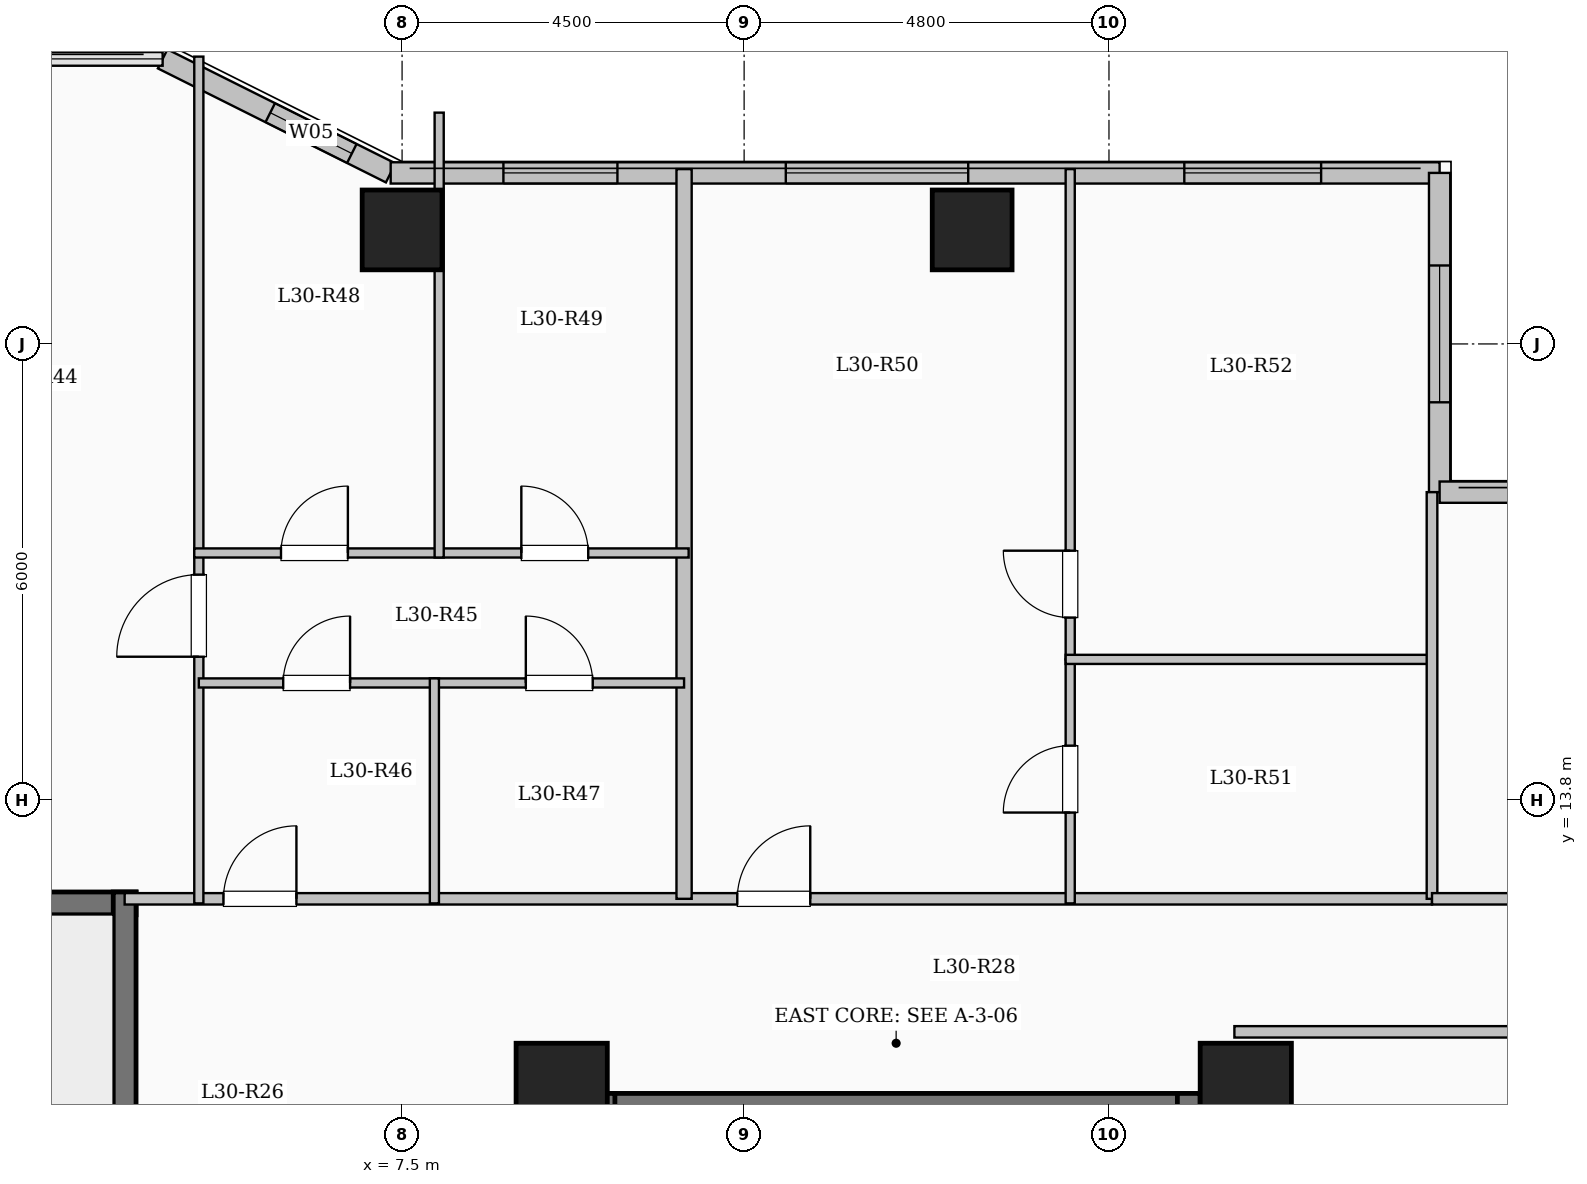
"""IFC4 building model, lengths in metres.
Left out: names, types, materials, properties, quantities, classifications, styles, units other than length and angle.
Written with IfcOpenShell. Run it as: python <this file> out.ifc"""

import sys

from ifc_helpers import new_model, si_unit, direction, frame, frame_2d, origin, origin_2d, place, context, subcontext, project, spatial, rectangle, extrude, element, fill, save


model = new_model("IFC4")
c1 = context("Model", 3, precision=1e-05, world=origin(), true_north=direction((0.0, 1.0)))
c2 = subcontext(c1, "Body", "Model", "MODEL_VIEW")
j1 = project(units=[si_unit("LENGTHUNIT", "METRE"), si_unit("PLANEANGLEUNIT", "RADIAN")], contexts=[c1])
p1 = place(None, origin())
s1 = spatial("IfcSite", under=j1, at=p1, CompositionType="ELEMENT")
p2 = place(p1, origin())
s2 = spatial("IfcBuilding", under=s1, at=p2, CompositionType="ELEMENT")
p3 = place(p2, frame((0.0, 0.0, 111.8)))
s3 = spatial("IfcBuildingStorey", under=s2, at=p3, CompositionType="ELEMENT", Elevation=111.8)
for number, where, z_axis, x_axis in (
    (1, (9.6, 10.0, 0.0), (0.0, 0.0, 1.0), (1.0, 0.0, 0.0)),
    (2, (18.6, 10.0, 0.0), (0.0, 0.0, 1.0), (1.0, 0.0, 0.0)),
):
    element("IfcColumn", number, at=place(p3, frame(where, z_axis=z_axis, x_axis=x_axis)), inside=s3, PredefinedType="COLUMN", context=c2, shape_type="SweptSolid", body=[
        extrude(rectangle(XDim=1.2, YDim=1.2, at=origin_2d()), origin(), (0.0, 0.0, 1.0), 3.35),
    ])
for number, where, z_axis, x_axis in (
    (3, (7.5, 21.3, 0.0), (0.0, 0.0, 1.0), (1.0, 0.0, 0.0)),
    (4, (15.0, 21.3, 0.0), (0.0, 0.0, 1.0), (1.0, 0.0, 0.0)),
):
    element("IfcColumn", number, at=place(p3, frame(where, z_axis=z_axis, x_axis=x_axis)), inside=s3, PredefinedType="COLUMN", context=c2, shape_type="SweptSolid", body=[
        extrude(rectangle(XDim=1.05, YDim=1.05, at=origin_2d()), origin(), (0.0, 0.0, 1.0), 3.35),
    ])
p4 = place(p3, frame((4.35, 23.55, 0.0), z_axis=(0.0, 0.0, 1.0), x_axis=(0.894427191, -0.4472135955, 0.0)))
e5 = element("IfcWall", 5, at=p4, inside=s3, PredefinedType="SOLIDWALL", context=c2, shape_type="SweptSolid", body=[
    extrude(rectangle(XDim=3.354, YDim=0.28, at=frame_2d((1.677, 0.0))), origin(), (0.0, 0.0, 1.0), 3.1),
])
p5 = place(p4, frame((1.583, 0.0, 0.95)))
e6 = element("IfcOpeningElement", 6, at=p5, cuts=e5, PredefinedType="OPENING", context=c2, shape_type="SweptSolid", body=[
    extrude(rectangle(XDim=1.2, YDim=1.5, at=frame_2d((0.6, 0.75))), frame((0.0, 0.15, 0.0), z_axis=(0.0, -1.0, 0.0), x_axis=(1.0, 0.0, 0.0)), (0.0, 0.0, 1.0), 0.3),
])
p6 = place(p3, frame((7.35, 22.05, 0.0), z_axis=(0.0, 0.0, 1.0), x_axis=(1.0, 0.0, 0.0)))
e7 = element("IfcWall", 7, at=p6, inside=s3, PredefinedType="SOLIDWALL", context=c2, shape_type="SweptSolid", body=[
    extrude(rectangle(XDim=13.8, YDim=0.28, at=frame_2d((6.9, 0.0))), origin(), (0.0, 0.0, 1.0), 3.1),
])
p7 = place(p6, frame((1.483, 0.0, 0.9)))
e8 = element("IfcOpeningElement", 8, at=p7, cuts=e7, PredefinedType="OPENING", context=c2, shape_type="SweptSolid", body=[
    extrude(rectangle(XDim=1.5, YDim=1.65, at=frame_2d((0.75, 0.825))), frame((0.0, 0.15, 0.0), z_axis=(0.0, -1.0, 0.0), x_axis=(1.0, 0.0, 0.0)), (0.0, 0.0, 1.0), 0.3),
])
p8 = place(p6, frame((5.198, 0.0, 0.9)))
e9 = element("IfcOpeningElement", 9, at=p8, cuts=e7, PredefinedType="OPENING", context=c2, shape_type="SweptSolid", body=[
    extrude(rectangle(XDim=2.4, YDim=1.8, at=frame_2d((1.2, 0.9))), frame((0.0, 0.15, 0.0), z_axis=(0.0, -1.0, 0.0), x_axis=(1.0, 0.0, 0.0)), (0.0, 0.0, 1.0), 0.3),
])
p9 = place(p6, frame((10.441, 0.0, 0.9)))
e10 = element("IfcOpeningElement", 10, at=p9, cuts=e7, PredefinedType="OPENING", context=c2, shape_type="SweptSolid", body=[
    extrude(rectangle(XDim=1.8, YDim=1.65, at=frame_2d((0.9, 0.825))), frame((0.0, 0.15, 0.0), z_axis=(0.0, -1.0, 0.0), x_axis=(1.0, 0.0, 0.0)), (0.0, 0.0, 1.0), 0.3),
])
p10 = place(p3, frame((21.15, 22.05, 0.0), z_axis=(0.0, 0.0, 1.0), x_axis=(0.0, -1.0, 0.0)))
e11 = element("IfcWall", 11, at=p10, inside=s3, PredefinedType="SOLIDWALL", context=c2, shape_type="SweptSolid", body=[
    extrude(rectangle(XDim=4.2, YDim=0.28, at=frame_2d((2.1, 0.0))), origin(), (0.0, 0.0, 1.0), 3.1),
])
p11 = place(p10, frame((1.218, 0.0, 0.9)))
e12 = element("IfcOpeningElement", 12, at=p11, cuts=e11, PredefinedType="OPENING", context=c2, shape_type="SweptSolid", body=[
    extrude(rectangle(XDim=1.8, YDim=1.65, at=frame_2d((0.9, 0.825))), frame((0.0, 0.15, 0.0), z_axis=(0.0, -1.0, 0.0), x_axis=(1.0, 0.0, 0.0)), (0.0, 0.0, 1.0), 0.3),
])
p12 = place(p3, frame((21.15, 17.85, 0.0), z_axis=(0.0, 0.0, 1.0), x_axis=(1.0, 0.0, 0.0)))
e13 = element("IfcWall", 13, at=p12, inside=s3, PredefinedType="SOLIDWALL", context=c2, shape_type="SweptSolid", body=[
    extrude(rectangle(XDim=5.7, YDim=0.28, at=frame_2d((2.85, 0.0))), origin(), (0.0, 0.0, 1.0), 3.1),
])
p13 = place(p12, frame((1.825, 0.0, 0.9)))
e14 = element("IfcOpeningElement", 14, at=p13, cuts=e13, PredefinedType="OPENING", context=c2, shape_type="SweptSolid", body=[
    extrude(rectangle(XDim=2.0, YDim=1.7, at=frame_2d((1.0, 0.85))), frame((0.0, 0.15, 0.0), z_axis=(0.0, -1.0, 0.0), x_axis=(1.0, 0.0, 0.0)), (0.0, 0.0, 1.0), 0.3),
])
p14 = place(p3, frame((10.0, 9.79, 0.0), z_axis=(0.0, 0.0, 1.0), x_axis=(1.0, 0.0, 0.0)))
e15 = element("IfcWall", 15, at=p14, inside=s3, PredefinedType="SHEAR", context=c2, shape_type="SweptSolid", body=[
    extrude(rectangle(XDim=8.0, YDim=0.3, at=frame_2d((4.0, 0.0))), origin(), (0.0, 0.0, 1.0), 3.35),
])
for number, where, z_axis, x_axis in (
    (16, (10.15, 6.35, 0.0), (0.0, 0.0, 1.0), (0.0, 1.0, 0.0)),
    (17, (17.85, 6.35, 0.0), (0.0, 0.0, 1.0), (0.0, 1.0, 0.0)),
):
    element("IfcWall", number, at=place(p3, frame(where, z_axis=z_axis, x_axis=x_axis)), inside=s3, PredefinedType="SHEAR", context=c2, shape_type="SweptSolid", body=[
        extrude(rectangle(XDim=3.59, YDim=0.3, at=frame_2d((1.795, 0.0))), origin(), (0.0, 0.0, 1.0), 3.35),
    ])
p15 = place(p3, frame((-4.0, 12.44, 0.0), z_axis=(0.0, 0.0, 1.0), x_axis=(1.0, 0.0, 0.0)))
e18 = element("IfcWall", 18, at=p15, inside=s3, PredefinedType="SHEAR", context=c2, shape_type="SweptSolid", body=[
    extrude(rectangle(XDim=8.0, YDim=0.3, at=frame_2d((4.0, 0.0))), origin(), (0.0, 0.0, 1.0), 3.35),
])
p16 = place(p3, frame((3.85, 9.0, 0.0), z_axis=(0.0, 0.0, 1.0), x_axis=(0.0, 1.0, 0.0)))
e19 = element("IfcWall", 19, at=p16, inside=s3, PredefinedType="SHEAR", context=c2, shape_type="SweptSolid", body=[
    extrude(rectangle(XDim=3.59, YDim=0.3, at=frame_2d((1.795, 0.0))), origin(), (0.0, 0.0, 1.0), 3.35),
])
p17 = place(p3, frame((3.85, 12.5, 0.0), z_axis=(0.0, 0.0, 1.0), x_axis=(1.0, 0.0, 0.0)))
e20 = element("IfcWall", 20, at=p17, inside=s3, PredefinedType="PARTITIONING", context=c2, shape_type="SweptSolid", body=[
    extrude(rectangle(XDim=17.2, YDim=0.15, at=frame_2d((8.6, 0.0))), origin(), (0.0, 0.0, 1.0), 3.1),
])
p18 = place(p17, frame((1.3, 0.0, 0.0)))
e21 = element("IfcOpeningElement", 21, at=p18, cuts=e20, PredefinedType="OPENING", context=c2, shape_type="SweptSolid", body=[
    extrude(rectangle(XDim=0.96, YDim=2.15, at=frame_2d((0.48, 1.075))), frame((0.0, 0.085, 0.0), z_axis=(0.0, -1.0, 0.0), x_axis=(1.0, 0.0, 0.0)), (0.0, 0.0, 1.0), 0.17),
])
p19 = place(p17, frame((8.06, 0.0, 0.0)))
e22 = element("IfcOpeningElement", 22, at=p19, cuts=e20, PredefinedType="OPENING", context=c2, shape_type="SweptSolid", body=[
    extrude(rectangle(XDim=0.96, YDim=2.15, at=frame_2d((0.48, 1.075))), frame((0.0, 0.085, 0.0), z_axis=(0.0, -1.0, 0.0), x_axis=(1.0, 0.0, 0.0)), (0.0, 0.0, 1.0), 0.17),
])
p20 = place(p3, frame((11.21, 12.5, 0.0), z_axis=(0.0, 0.0, 1.0), x_axis=(0.0, 1.0, 0.0)))
e23 = element("IfcWall", 23, at=p20, inside=s3, PredefinedType="SOLIDWALL", context=c2, shape_type="SweptSolid", body=[
    extrude(rectangle(XDim=9.6, YDim=0.2, at=frame_2d((4.8, 0.0))), origin(), (0.0, 0.0, 1.0), 3.1),
])
p21 = place(p3, frame((4.826, 12.44, 0.0), z_axis=(0.0, 0.0, 1.0), x_axis=(0.0, 1.0, 0.0)))
e24 = element("IfcWall", 24, at=p21, inside=s3, PredefinedType="PARTITIONING", context=c2, shape_type="SweptSolid", body=[
    extrude(rectangle(XDim=11.14, YDim=0.12, at=frame_2d((5.57, 0.0))), origin(), (0.0, 0.0, 1.0), 3.1),
])
p22 = place(p21, frame((3.245, 0.0, 0.0)))
e25 = element("IfcOpeningElement", 25, at=p22, cuts=e24, PredefinedType="OPENING", context=c2, shape_type="SweptSolid", body=[
    extrude(rectangle(XDim=1.08, YDim=2.15, at=frame_2d((0.54, 1.075))), frame((0.0, 0.07, 0.0), z_axis=(0.0, -1.0, 0.0), x_axis=(1.0, 0.0, 0.0)), (0.0, 0.0, 1.0), 0.14),
])
p23 = place(p3, frame((4.826, 15.34, 0.0), z_axis=(0.0, 0.0, 1.0), x_axis=(1.0, 0.0, 0.0)))
e26 = element("IfcWall", 26, at=p23, inside=s3, PredefinedType="PARTITIONING", context=c2, shape_type="SweptSolid", body=[
    extrude(rectangle(XDim=3.099, YDim=0.12, at=frame_2d((1.55, 0.0))), origin(), (0.0, 0.0, 1.0), 3.1),
])
p24 = place(p23, frame((1.11, 0.0, 0.0)))
e27 = element("IfcOpeningElement", 27, at=p24, cuts=e26, PredefinedType="OPENING", context=c2, shape_type="SweptSolid", body=[
    extrude(rectangle(XDim=0.88, YDim=2.1, at=frame_2d((0.44, 1.05))), frame((0.0, 0.07, 0.0), z_axis=(0.0, -1.0, 0.0), x_axis=(1.0, 0.0, 0.0)), (0.0, 0.0, 1.0), 0.14),
])
p25 = place(p3, frame((7.925, 15.34, 0.0), z_axis=(0.0, 0.0, 1.0), x_axis=(1.0, 0.0, 0.0)))
e28 = element("IfcWall", 28, at=p25, inside=s3, PredefinedType="PARTITIONING", context=c2, shape_type="SweptSolid", body=[
    extrude(rectangle(XDim=3.285, YDim=0.12, at=frame_2d((1.643, 0.0))), origin(), (0.0, 0.0, 1.0), 3.1),
])
p26 = place(p25, frame((1.203, 0.0, 0.0)))
e29 = element("IfcOpeningElement", 29, at=p26, cuts=e28, PredefinedType="OPENING", context=c2, shape_type="SweptSolid", body=[
    extrude(rectangle(XDim=0.88, YDim=2.1, at=frame_2d((0.44, 1.05))), frame((0.0, 0.07, 0.0), z_axis=(0.0, -1.0, 0.0), x_axis=(1.0, 0.0, 0.0)), (0.0, 0.0, 1.0), 0.14),
])
p27 = place(p3, frame((4.766, 17.05, 0.0), z_axis=(0.0, 0.0, 1.0), x_axis=(1.0, 0.0, 0.0)))
e30 = element("IfcWall", 30, at=p27, inside=s3, PredefinedType="PARTITIONING", context=c2, shape_type="SweptSolid", body=[
    extrude(rectangle(XDim=6.504, YDim=0.12, at=frame_2d((3.252, 0.0))), origin(), (0.0, 0.0, 1.0), 3.1),
])
p28 = place(p27, frame((1.141, 0.0, 0.0)))
e31 = element("IfcOpeningElement", 31, at=p28, cuts=e30, PredefinedType="OPENING", context=c2, shape_type="SweptSolid", body=[
    extrude(rectangle(XDim=0.88, YDim=2.1, at=frame_2d((0.44, 1.05))), frame((0.0, 0.07, 0.0), z_axis=(0.0, -1.0, 0.0), x_axis=(1.0, 0.0, 0.0)), (0.0, 0.0, 1.0), 0.14),
])
p29 = place(p27, frame((4.303, 0.0, 0.0)))
e32 = element("IfcOpeningElement", 32, at=p29, cuts=e30, PredefinedType="OPENING", context=c2, shape_type="SweptSolid", body=[
    extrude(rectangle(XDim=0.88, YDim=2.1, at=frame_2d((0.44, 1.05))), frame((0.0, 0.07, 0.0), z_axis=(0.0, -1.0, 0.0), x_axis=(1.0, 0.0, 0.0)), (0.0, 0.0, 1.0), 0.14),
])
p30 = place(p3, frame((7.925, 12.44, 0.0), z_axis=(0.0, 0.0, 1.0), x_axis=(0.0, 1.0, 0.0)))
e33 = element("IfcWall", 33, at=p30, inside=s3, PredefinedType="PARTITIONING", context=c2, shape_type="SweptSolid", body=[
    extrude(rectangle(XDim=2.96, YDim=0.12, at=frame_2d((1.48, 0.0))), origin(), (0.0, 0.0, 1.0), 2.435),
])
p31 = place(p3, frame((7.988, 16.99, 0.0), z_axis=(0.0, 0.0, 1.0), x_axis=(0.0, 1.0, 0.0)))
e34 = element("IfcWall", 34, at=p31, inside=s3, PredefinedType="PARTITIONING", context=c2, shape_type="SweptSolid", body=[
    extrude(rectangle(XDim=5.853, YDim=0.12, at=frame_2d((2.927, 0.0))), origin(), (0.0, 0.0, 1.0), 2.435),
])
p32 = place(p3, frame((16.29, 12.44, 0.0), z_axis=(0.0, 0.0, 1.0), x_axis=(0.0, 1.0, 0.0)))
e35 = element("IfcWall", 35, at=p32, inside=s3, PredefinedType="PARTITIONING", context=c2, shape_type="SweptSolid", body=[
    extrude(rectangle(XDim=3.21, YDim=0.12, at=frame_2d((1.605, 0.0))), origin(), (0.0, 0.0, 1.0), 3.1),
])
p33 = place(p32, frame((1.195, 0.0, 0.0)))
e36 = element("IfcOpeningElement", 36, at=p33, cuts=e35, PredefinedType="OPENING", context=c2, shape_type="SweptSolid", body=[
    extrude(rectangle(XDim=0.88, YDim=2.1, at=frame_2d((0.44, 1.05))), frame((0.0, 0.07, 0.0), z_axis=(0.0, -1.0, 0.0), x_axis=(1.0, 0.0, 0.0)), (0.0, 0.0, 1.0), 0.14),
])
p34 = place(p3, frame((16.29, 15.65, 0.0), z_axis=(0.0, 0.0, 1.0), x_axis=(0.0, 1.0, 0.0)))
e37 = element("IfcWall", 37, at=p34, inside=s3, PredefinedType="PARTITIONING", context=c2, shape_type="SweptSolid", body=[
    extrude(rectangle(XDim=6.45, YDim=0.12, at=frame_2d((3.225, 0.0))), origin(), (0.0, 0.0, 1.0), 3.1),
])
p35 = place(p34, frame((0.55, 0.0, 0.0)))
e38 = element("IfcOpeningElement", 38, at=p35, cuts=e37, PredefinedType="OPENING", context=c2, shape_type="SweptSolid", body=[
    extrude(rectangle(XDim=0.88, YDim=2.1, at=frame_2d((0.44, 1.05))), frame((0.0, 0.07, 0.0), z_axis=(0.0, -1.0, 0.0), x_axis=(1.0, 0.0, 0.0)), (0.0, 0.0, 1.0), 0.14),
])
p36 = place(p3, frame((16.23, 15.65, 0.0), z_axis=(0.0, 0.0, 1.0), x_axis=(1.0, 0.0, 0.0)))
e39 = element("IfcWall", 39, at=p36, inside=s3, PredefinedType="PARTITIONING", context=c2, shape_type="SweptSolid", body=[
    extrude(rectangle(XDim=4.88, YDim=0.12, at=frame_2d((2.44, 0.0))), origin(), (0.0, 0.0, 1.0), 3.1),
])
p37 = place(p3, frame((18.45, 10.75, 0.0), z_axis=(0.0, 0.0, 1.0), x_axis=(1.0, 0.0, 0.0)))
e40 = element("IfcWall", 40, at=p37, inside=s3, PredefinedType="PARTITIONING", context=c2, shape_type="SweptSolid", body=[
    extrude(rectangle(XDim=8.43, YDim=0.15, at=frame_2d((4.215, 0.0))), origin(), (0.0, 0.0, 1.0), 3.1),
])
p38 = place(p3, frame((21.05, 12.5, 0.0), z_axis=(0.0, 0.0, 1.0), x_axis=(0.0, 1.0, 0.0)))
e41 = element("IfcWall", 41, at=p38, inside=s3, PredefinedType="PARTITIONING", context=c2, shape_type="SweptSolid", body=[
    extrude(rectangle(XDim=5.35, YDim=0.14, at=frame_2d((2.675, 0.0))), origin(), (0.0, 0.0, 1.0), 3.1),
])
p39 = place(p3, frame((21.05, 12.5, 0.0), z_axis=(0.0, 0.0, 1.0), x_axis=(1.0, 0.0, 0.0)))
e42 = element("IfcWall", 42, at=p39, inside=s3, PredefinedType="PARTITIONING", context=c2, shape_type="SweptSolid", body=[
    extrude(rectangle(XDim=5.83, YDim=0.15, at=frame_2d((2.915, 0.0))), origin(), (0.0, 0.0, 1.0), 3.1),
])
p40 = place(p39, frame((2.44, 0.0, 0.0)))
e43 = element("IfcOpeningElement", 43, at=p40, cuts=e42, PredefinedType="OPENING", context=c2, shape_type="SweptSolid", body=[
    extrude(rectangle(XDim=0.95, YDim=2.15, at=frame_2d((0.475, 1.075))), frame((0.0, 0.085, 0.0), z_axis=(0.0, -1.0, 0.0), x_axis=(1.0, 0.0, 0.0)), (0.0, 0.0, 1.0), 0.17),
])
p41 = place(p5, origin())
e44 = element("IfcWindow", 44, at=p41, inside=s3, PartitioningType="SINGLE_PANEL", PredefinedType="WINDOW", context=c2, shape_type="SweptSolid", body=[
    extrude(rectangle(XDim=1.2, YDim=1.5, at=frame_2d((0.6, 0.75))), frame((0.0, 0.03, 0.0), z_axis=(0.0, -1.0, 0.0), x_axis=(1.0, 0.0, 0.0)), (0.0, 0.0, 1.0), 0.06),
])
fill(e6, e44)
p42 = place(p7, origin())
e45 = element("IfcWindow", 45, at=p42, inside=s3, PartitioningType="SINGLE_PANEL", PredefinedType="WINDOW", context=c2, shape_type="SweptSolid", body=[
    extrude(rectangle(XDim=1.5, YDim=1.65, at=frame_2d((0.75, 0.825))), frame((0.0, 0.03, 0.0), z_axis=(0.0, -1.0, 0.0), x_axis=(1.0, 0.0, 0.0)), (0.0, 0.0, 1.0), 0.06),
])
fill(e8, e45)
p43 = place(p8, origin())
e46 = element("IfcWindow", 46, at=p43, inside=s3, PartitioningType="SINGLE_PANEL", PredefinedType="WINDOW", context=c2, shape_type="SweptSolid", body=[
    extrude(rectangle(XDim=2.4, YDim=1.8, at=frame_2d((1.2, 0.9))), frame((0.0, 0.03, 0.0), z_axis=(0.0, -1.0, 0.0), x_axis=(1.0, 0.0, 0.0)), (0.0, 0.0, 1.0), 0.06),
])
fill(e9, e46)
p44 = place(p9, origin())
e47 = element("IfcWindow", 47, at=p44, inside=s3, PartitioningType="SINGLE_PANEL", PredefinedType="WINDOW", context=c2, shape_type="SweptSolid", body=[
    extrude(rectangle(XDim=1.8, YDim=1.65, at=frame_2d((0.9, 0.825))), frame((0.0, 0.03, 0.0), z_axis=(0.0, -1.0, 0.0), x_axis=(1.0, 0.0, 0.0)), (0.0, 0.0, 1.0), 0.06),
])
fill(e10, e47)
p45 = place(p11, origin())
e48 = element("IfcWindow", 48, at=p45, inside=s3, PartitioningType="SINGLE_PANEL", PredefinedType="WINDOW", context=c2, shape_type="SweptSolid", body=[
    extrude(rectangle(XDim=1.8, YDim=1.65, at=frame_2d((0.9, 0.825))), frame((0.0, 0.03, 0.0), z_axis=(0.0, -1.0, 0.0), x_axis=(1.0, 0.0, 0.0)), (0.0, 0.0, 1.0), 0.06),
])
fill(e12, e48)
p46 = place(p18, origin())
e49 = element("IfcDoor", 49, at=p46, inside=s3, OperationType="SINGLE_SWING_RIGHT", PredefinedType="DOOR", context=c2, shape_type="SweptSolid", body=[
    extrude(rectangle(XDim=0.96, YDim=2.15, at=frame_2d((0.48, 1.075))), frame((0.0, 0.025, 0.0), z_axis=(0.0, -1.0, 0.0), x_axis=(1.0, 0.0, 0.0)), (0.0, 0.0, 1.0), 0.05),
])
fill(e21, e49)
p47 = place(p22, origin())
e50 = element("IfcDoor", 50, at=p47, inside=s3, OperationType="SINGLE_SWING_LEFT", PredefinedType="DOOR", context=c2, shape_type="SweptSolid", body=[
    extrude(rectangle(XDim=1.08, YDim=2.15, at=frame_2d((0.54, 1.075))), frame((0.0, 0.025, 0.0), z_axis=(0.0, -1.0, 0.0), x_axis=(1.0, 0.0, 0.0)), (0.0, 0.0, 1.0), 0.05),
])
fill(e25, e50)
p48 = place(p24, origin())
e51 = element("IfcDoor", 51, at=p48, inside=s3, OperationType="SINGLE_SWING_RIGHT", PredefinedType="DOOR", context=c2, shape_type="SweptSolid", body=[
    extrude(rectangle(XDim=0.88, YDim=2.1, at=frame_2d((0.44, 1.05))), frame((0.0, 0.025, 0.0), z_axis=(0.0, -1.0, 0.0), x_axis=(1.0, 0.0, 0.0)), (0.0, 0.0, 1.0), 0.05),
])
fill(e27, e51)
p49 = place(p26, origin())
e52 = element("IfcDoor", 52, at=p49, inside=s3, OperationType="SINGLE_SWING_LEFT", PredefinedType="DOOR", context=c2, shape_type="SweptSolid", body=[
    extrude(rectangle(XDim=0.88, YDim=2.1, at=frame_2d((0.44, 1.05))), frame((0.0, 0.025, 0.0), z_axis=(0.0, -1.0, 0.0), x_axis=(1.0, 0.0, 0.0)), (0.0, 0.0, 1.0), 0.05),
])
fill(e29, e52)
p50 = place(p28, origin())
e53 = element("IfcDoor", 53, at=p50, inside=s3, OperationType="SINGLE_SWING_RIGHT", PredefinedType="DOOR", context=c2, shape_type="SweptSolid", body=[
    extrude(rectangle(XDim=0.88, YDim=2.1, at=frame_2d((0.44, 1.05))), frame((0.0, 0.025, 0.0), z_axis=(0.0, -1.0, 0.0), x_axis=(1.0, 0.0, 0.0)), (0.0, 0.0, 1.0), 0.05),
])
fill(e31, e53)
p51 = place(p29, origin())
e54 = element("IfcDoor", 54, at=p51, inside=s3, OperationType="SINGLE_SWING_LEFT", PredefinedType="DOOR", context=c2, shape_type="SweptSolid", body=[
    extrude(rectangle(XDim=0.88, YDim=2.1, at=frame_2d((0.44, 1.05))), frame((0.0, 0.025, 0.0), z_axis=(0.0, -1.0, 0.0), x_axis=(1.0, 0.0, 0.0)), (0.0, 0.0, 1.0), 0.05),
])
fill(e32, e54)
p52 = place(p19, origin())
e55 = element("IfcDoor", 55, at=p52, inside=s3, OperationType="SINGLE_SWING_RIGHT", PredefinedType="DOOR", context=c2, shape_type="SweptSolid", body=[
    extrude(rectangle(XDim=0.96, YDim=2.15, at=frame_2d((0.48, 1.075))), frame((0.0, 0.025, 0.0), z_axis=(0.0, -1.0, 0.0), x_axis=(1.0, 0.0, 0.0)), (0.0, 0.0, 1.0), 0.05),
])
fill(e22, e55)
p53 = place(p33, origin())
e56 = element("IfcDoor", 56, at=p53, inside=s3, OperationType="SINGLE_SWING_LEFT", PredefinedType="DOOR", context=c2, shape_type="SweptSolid", body=[
    extrude(rectangle(XDim=0.88, YDim=2.1, at=frame_2d((0.44, 1.05))), frame((0.0, 0.025, 0.0), z_axis=(0.0, -1.0, 0.0), x_axis=(1.0, 0.0, 0.0)), (0.0, 0.0, 1.0), 0.05),
])
fill(e36, e56)
p54 = place(p35, origin())
e57 = element("IfcDoor", 57, at=p54, inside=s3, OperationType="SINGLE_SWING_RIGHT", PredefinedType="DOOR", context=c2, shape_type="SweptSolid", body=[
    extrude(rectangle(XDim=0.88, YDim=2.1, at=frame_2d((0.44, 1.05))), frame((0.0, 0.025, 0.0), z_axis=(0.0, -1.0, 0.0), x_axis=(1.0, 0.0, 0.0)), (0.0, 0.0, 1.0), 0.05),
])
fill(e38, e57)
save(model, sys.argv[1])
